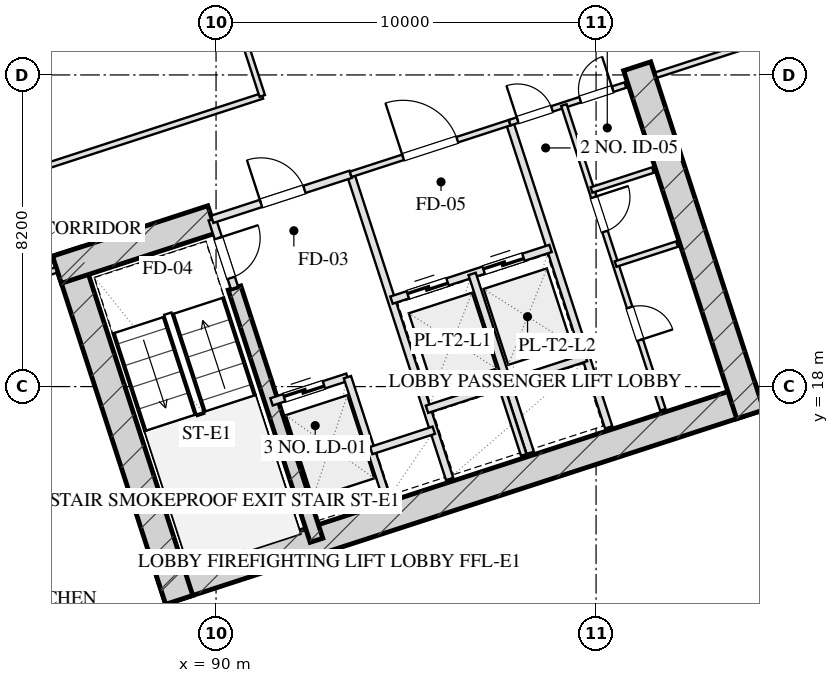
"""IFC4 building model, lengths in metres.
Left out: names, types, materials, properties, quantities, classifications, styles, units other than length and angle.
Written with IfcOpenShell. Run it as: python <this file> out.ifc"""

import sys

from ifc_helpers import new_model, si_unit, direction, frame, frame_2d, origin, place, context, subcontext, project, spatial, rectangle, extrude, element, fill, save


model = new_model("IFC4")
c1 = context("Model", 3, precision=1e-05, world=origin(), true_north=direction((0.0, 1.0)))
c2 = subcontext(c1, "Body", "Model", "MODEL_VIEW")
j1 = project(units=[si_unit("LENGTHUNIT", "METRE"), si_unit("PLANEANGLEUNIT", "RADIAN")], contexts=[c1])
p1 = place(None, origin())
s1 = spatial("IfcSite", under=j1, at=p1, CompositionType="ELEMENT")
p2 = place(p1, origin())
s2 = spatial("IfcBuilding", under=s1, at=p2, CompositionType="ELEMENT")
p3 = place(p2, frame((0.0, 0.0, 71.3)))
s3 = spatial("IfcBuildingStorey", under=s2, at=p3, CompositionType="ELEMENT", Elevation=71.3)
p4 = place(p3, frame((88.559, 12.629, 0.0), z_axis=(0.0, 0.0, 1.0), x_axis=(0.951056072937, 0.309018358888, 0.0)))
e1 = element("IfcWall", 1, at=p4, inside=s3, PredefinedType="SHEAR", context=c2, shape_type="SweptSolid", body=[
    extrude(rectangle(XDim=16.55, YDim=0.75, at=frame_2d((8.275, 0.0))), origin(), (0.0, 0.0, 1.0), 3.45),
])
p5 = place(p3, frame((86.055, 21.546, 0.0), z_axis=(0.0, 0.0, 1.0), x_axis=(0.309023585745, -0.951054374604, 0.0)))
e2 = element("IfcWall", 2, at=p5, inside=s3, PredefinedType="SHEAR", context=c2, shape_type="SweptSolid", body=[
    extrude(rectangle(XDim=9.63, YDim=0.75, at=frame_2d((4.815, 0.0))), origin(), (0.0, 0.0, 1.0), 3.45),
])
p6 = place(p3, frame((101.082, 26.429, 0.0), z_axis=(0.0, 0.0, 1.0), x_axis=(0.309016134813, -0.951056795583, 0.0)))
e3 = element("IfcWall", 3, at=p6, inside=s3, PredefinedType="SHEAR", context=c2, shape_type="SweptSolid", body=[
    extrude(rectangle(XDim=9.63, YDim=0.75, at=frame_2d((4.815, 0.0))), origin(), (0.0, 0.0, 1.0), 3.45),
])
p7 = place(p3, frame((90.486, 20.594, 0.0), z_axis=(0.0, 0.0, 1.0), x_axis=(0.309020428229, -0.951055400562, 0.0)))
e4 = element("IfcWall", 4, at=p7, inside=s3, PredefinedType="SHEAR", context=c2, shape_type="SweptSolid", body=[
    extrude(rectangle(XDim=6.98, YDim=0.35, at=frame_2d((3.49, 0.0))), origin(), (0.0, 0.0, 1.0), 3.45),
])
p8 = place(p3, frame((85.814, 21.074, 0.0), z_axis=(0.0, 0.0, 1.0), x_axis=(0.95106580992, 0.308988390074, 0.0)))
e5 = element("IfcWall", 5, at=p8, inside=s3, PredefinedType="SHEAR", context=c2, shape_type="SweptSolid", body=[
    extrude(rectangle(XDim=4.295, YDim=0.75, at=frame_2d((2.147, 0.0))), origin(), (0.0, 0.0, 1.0), 3.45),
])
p9 = place(p3, frame((100.345, 63.648, 0.0), z_axis=(0.0, 0.0, 1.0), x_axis=(0.309014526607, -0.951057318118, 0.0)))
e6 = element("IfcWall", 6, at=p9, inside=s3, PredefinedType="SOLIDWALL", context=c2, shape_type="SweptSolid", body=[
    extrude(rectangle(XDim=50.0, YDim=0.4, at=frame_2d((25.0, 0.0))), origin(), (0.0, 0.0, 1.0), 2.61),
])
p10 = place(p9, frame((30.15, 0.0, 0.75)))
e7 = element("IfcOpeningElement", 7, at=p10, cuts=e6, PredefinedType="OPENING", context=c2, shape_type="SweptSolid", body=[
    extrude(rectangle(XDim=2.5, YDim=1.46, at=frame_2d((1.25, 0.73))), frame((0.0, 0.21, 0.0), z_axis=(0.0, -1.0, 0.0), x_axis=(1.0, 0.0, 0.0)), (0.0, 0.0, 1.0), 0.42),
])
p11 = place(p9, frame((21.445, 0.0, 0.0)))
e8 = element("IfcOpeningElement", 8, at=p11, cuts=e6, PredefinedType="OPENING", context=c2, shape_type="SweptSolid", body=[
    extrude(rectangle(XDim=1.1, YDim=2.15, at=frame_2d((0.55, 1.075))), frame((0.0, 0.21, 0.0), z_axis=(0.0, -1.0, 0.0), x_axis=(1.0, 0.0, 0.0)), (0.0, 0.0, 1.0), 0.42),
])
p12 = place(p3, frame((113.998, 12.567, 0.0), z_axis=(0.0, 0.0, 1.0), x_axis=(-0.951055939317, -0.309018770125, 0.0)))
e9 = element("IfcWall", 9, at=p12, inside=s3, PredefinedType="SOLIDWALL", context=c2, shape_type="SweptSolid", body=[
    extrude(rectangle(XDim=32.4, YDim=0.4, at=frame_2d((16.2, 0.0))), origin(), (0.0, 0.0, 1.0), 2.61),
])
p13 = place(p3, frame((89.899, 22.401, 0.0), z_axis=(0.0, 0.0, 1.0), x_axis=(0.308932062672, -0.951084108086, 0.0)))
e10 = element("IfcWall", 10, at=p13, inside=s3, PredefinedType="PARTITIONING", context=c2, shape_type="SweptSolid", body=[
    extrude(rectangle(XDim=1.9, YDim=0.2, at=frame_2d((0.95, 0.0))), origin(), (0.0, 0.0, 1.0), 3.175),
])
p14 = place(p13, frame((0.52, 0.0, 0.0)))
e11 = element("IfcOpeningElement", 11, at=p14, cuts=e10, PredefinedType="OPENING", context=c2, shape_type="SweptSolid", body=[
    extrude(rectangle(XDim=1.1, YDim=2.05, at=frame_2d((0.55, 1.025))), frame((0.0, 0.11, 0.0), z_axis=(0.0, -1.0, 0.0), x_axis=(1.0, 0.0, 0.0)), (0.0, 0.0, 1.0), 0.22),
])
p15 = place(p3, frame((93.542, 23.585, 0.0), z_axis=(0.0, 0.0, 1.0), x_axis=(0.309042196757, -0.951048327176, 0.0)))
e12 = element("IfcWall", 12, at=p15, inside=s3, PredefinedType="PARTITIONING", context=c2, shape_type="SweptSolid", body=[
    extrude(rectangle(XDim=8.43, YDim=0.2, at=frame_2d((4.215, 0.0))), origin(), (0.0, 0.0, 1.0), 3.175),
])
p16 = place(p3, frame((89.899, 22.401, 0.0), z_axis=(0.0, 0.0, 1.0), x_axis=(0.951046716504, 0.309047153403, 0.0)))
e13 = element("IfcWall", 13, at=p16, inside=s3, PredefinedType="PARTITIONING", context=c2, shape_type="SweptSolid", body=[
    extrude(rectangle(XDim=3.83, YDim=0.2, at=frame_2d((1.915, 0.0))), origin(), (0.0, 0.0, 1.0), 3.175),
])
p17 = place(p16, frame((1.35, 0.0, 0.0)))
e14 = element("IfcOpeningElement", 14, at=p17, cuts=e13, PredefinedType="OPENING", context=c2, shape_type="SweptSolid", body=[
    extrude(rectangle(XDim=1.2, YDim=2.05, at=frame_2d((0.6, 1.025))), frame((0.0, 0.11, 0.0), z_axis=(0.0, -1.0, 0.0), x_axis=(1.0, 0.0, 0.0)), (0.0, 0.0, 1.0), 0.22),
])
p18 = place(p3, frame((91.46, 17.598, 0.0), z_axis=(0.0, 0.0, 1.0), x_axis=(0.951062257173, 0.308999325213, 0.0)))
e15 = element("IfcWall", 15, at=p18, inside=s3, PredefinedType="PARTITIONING", context=c2, shape_type="SweptSolid", body=[
    extrude(rectangle(XDim=2.1, YDim=0.2, at=frame_2d((1.05, 0.0))), origin(), (0.0, 0.0, 1.0), 3.175),
])
p19 = place(p18, frame((0.35, 0.0, 0.0)))
e16 = element("IfcOpeningElement", 16, at=p19, cuts=e15, PredefinedType="OPENING", context=c2, shape_type="SweptSolid", body=[
    extrude(rectangle(XDim=1.1, YDim=2.05, at=frame_2d((0.55, 1.025))), frame((0.0, 0.11, 0.0), z_axis=(0.0, -1.0, 0.0), x_axis=(1.0, 0.0, 0.0)), (0.0, 0.0, 1.0), 0.22),
])
p20 = place(p3, frame((93.457, 18.247, 0.0), z_axis=(0.0, 0.0, 1.0), x_axis=(0.3089935693, -0.951064127245, 0.0)))
e17 = element("IfcWall", 17, at=p20, inside=s3, PredefinedType="PARTITIONING", context=c2, shape_type="SweptSolid", body=[
    extrude(rectangle(XDim=3.7, YDim=0.2, at=frame_2d((1.85, 0.0))), origin(), (0.0, 0.0, 1.0), 3.175),
])
p21 = place(p3, frame((94.084, 16.317, 0.0), z_axis=(0.0, 0.0, 1.0), x_axis=(0.951041328149, 0.309063734775, 0.0)))
e18 = element("IfcWall", 18, at=p21, inside=s3, PredefinedType="PARTITIONING", context=c2, shape_type="SweptSolid", body=[
    extrude(rectangle(XDim=1.73, YDim=0.2, at=frame_2d((0.865, 0.0))), origin(), (0.0, 0.0, 1.0), 3.175),
])
p22 = place(p3, frame((97.727, 24.944, 0.0), z_axis=(0.0, 0.0, 1.0), x_axis=(0.309016001439, -0.951056838919, 0.0)))
e19 = element("IfcWall", 19, at=p22, inside=s3, PredefinedType="PARTITIONING", context=c2, shape_type="SweptSolid", body=[
    extrude(rectangle(XDim=8.43, YDim=0.2, at=frame_2d((4.215, 0.0))), origin(), (0.0, 0.0, 1.0), 3.175),
])
p23 = place(p3, frame((93.542, 23.585, 0.0), z_axis=(0.0, 0.0, 1.0), x_axis=(0.951063829732, 0.308994485023, 0.0)))
e20 = element("IfcWall", 20, at=p23, inside=s3, PredefinedType="PARTITIONING", context=c2, shape_type="SweptSolid", body=[
    extrude(rectangle(XDim=4.4, YDim=0.15, at=frame_2d((2.2, 0.0))), origin(), (0.0, 0.0, 1.0), 3.175),
])
p24 = place(p23, frame((1.45, 0.0, 0.0)))
e21 = element("IfcOpeningElement", 21, at=p24, cuts=e20, PredefinedType="OPENING", context=c2, shape_type="SweptSolid", body=[
    extrude(rectangle(XDim=1.5, YDim=2.05, at=frame_2d((0.75, 1.025))), frame((0.0, 0.085, 0.0), z_axis=(0.0, -1.0, 0.0), x_axis=(1.0, 0.0, 0.0)), (0.0, 0.0, 1.0), 0.17),
])
p25 = place(p3, frame((94.617, 20.275, 0.0), z_axis=(0.0, 0.0, 1.0), x_axis=(0.951058531764, 0.30901079133, 0.0)))
e22 = element("IfcWall", 22, at=p25, inside=s3, PredefinedType="PARTITIONING", context=c2, shape_type="SweptSolid", body=[
    extrude(rectangle(XDim=4.4, YDim=0.2, at=frame_2d((2.2, 0.0))), origin(), (0.0, 0.0, 1.0), 3.175),
])
p26 = place(p25, frame((0.45, 0.0, 0.0)))
e23 = element("IfcOpeningElement", 23, at=p26, cuts=e22, PredefinedType="OPENING", context=c2, shape_type="SweptSolid", body=[
    extrude(rectangle(XDim=1.1, YDim=2.05, at=frame_2d((0.55, 1.025))), frame((0.0, 0.11, 0.0), z_axis=(0.0, -1.0, 0.0), x_axis=(1.0, 0.0, 0.0)), (0.0, 0.0, 1.0), 0.22),
])
p27 = place(p25, frame((2.55, 0.0, 0.0)))
e24 = element("IfcOpeningElement", 24, at=p27, cuts=e22, PredefinedType="OPENING", context=c2, shape_type="SweptSolid", body=[
    extrude(rectangle(XDim=1.1, YDim=2.05, at=frame_2d((0.55, 1.025))), frame((0.0, 0.11, 0.0), z_axis=(0.0, -1.0, 0.0), x_axis=(1.0, 0.0, 0.0)), (0.0, 0.0, 1.0), 0.22),
])
p28 = place(p3, frame((96.738, 20.964, 0.0), z_axis=(0.0, 0.0, 1.0), x_axis=(0.309042578481, -0.951048203135, 0.0)))
e25 = element("IfcWall", 25, at=p28, inside=s3, PredefinedType="PARTITIONING", context=c2, shape_type="SweptSolid", body=[
    extrude(rectangle(XDim=4.95, YDim=0.2, at=frame_2d((2.475, 0.0))), origin(), (0.0, 0.0, 1.0), 3.175),
])
p29 = place(p3, frame((95.551, 17.403, 0.0), z_axis=(0.0, 0.0, 1.0), x_axis=(0.951058531764, 0.30901079133, 0.0)))
e26 = element("IfcWall", 26, at=p29, inside=s3, PredefinedType="PARTITIONING", context=c2, shape_type="SweptSolid", body=[
    extrude(rectangle(XDim=4.4, YDim=0.2, at=frame_2d((2.2, 0.0))), origin(), (0.0, 0.0, 1.0), 3.175),
])
p30 = place(p3, frame((97.516, 17.989, 0.0), z_axis=(0.0, 0.0, 1.0), x_axis=(0.30897153969, -0.951071284217, 0.0)))
e27 = element("IfcWall", 27, at=p30, inside=s3, PredefinedType="PARTITIONING", context=c2, shape_type="SweptSolid", body=[
    extrude(rectangle(XDim=1.88, YDim=0.15, at=frame_2d((0.94, 0.0))), origin(), (0.0, 0.0, 1.0), 3.175),
])
p31 = place(p3, frame((97.727, 24.944, 0.0), z_axis=(0.0, 0.0, 1.0), x_axis=(0.951036872128, 0.309077446369, 0.0)))
e28 = element("IfcWall", 28, at=p31, inside=s3, PredefinedType="PARTITIONING", context=c2, shape_type="SweptSolid", body=[
    extrude(rectangle(XDim=3.2, YDim=0.15, at=frame_2d((1.6, 0.0))), origin(), (0.0, 0.0, 1.0), 3.175),
])
p32 = place(p31, frame((0.22, 0.0, 0.0)))
e29 = element("IfcOpeningElement", 29, at=p32, cuts=e28, PredefinedType="OPENING", context=c2, shape_type="SweptSolid", body=[
    extrude(rectangle(XDim=0.95, YDim=2.05, at=frame_2d((0.475, 1.025))), frame((0.0, 0.085, 0.0), z_axis=(0.0, -1.0, 0.0), x_axis=(1.0, 0.0, 0.0)), (0.0, 0.0, 1.0), 0.17),
])
p33 = place(p31, frame((1.95, 0.0, 0.0)))
e30 = element("IfcOpeningElement", 30, at=p33, cuts=e28, PredefinedType="OPENING", context=c2, shape_type="SweptSolid", body=[
    extrude(rectangle(XDim=0.9, YDim=2.05, at=frame_2d((0.45, 1.025))), frame((0.0, 0.085, 0.0), z_axis=(0.0, -1.0, 0.0), x_axis=(1.0, 0.0, 0.0)), (0.0, 0.0, 1.0), 0.17),
])
p34 = place(p3, frame((99.153, 25.408, 0.0), z_axis=(0.0, 0.0, 1.0), x_axis=(0.309016001439, -0.951056838919, 0.0)))
e31 = element("IfcWall", 31, at=p34, inside=s3, PredefinedType="PARTITIONING", context=c2, shape_type="SweptSolid", body=[
    extrude(rectangle(XDim=8.43, YDim=0.15, at=frame_2d((4.215, 0.0))), origin(), (0.0, 0.0, 1.0), 3.175),
])
p35 = place(p34, frame((2.55, 0.0, 0.0)))
e32 = element("IfcOpeningElement", 32, at=p35, cuts=e31, PredefinedType="OPENING", context=c2, shape_type="SweptSolid", body=[
    extrude(rectangle(XDim=0.95, YDim=2.05, at=frame_2d((0.475, 1.025))), frame((0.0, 0.085, 0.0), z_axis=(0.0, -1.0, 0.0), x_axis=(1.0, 0.0, 0.0)), (0.0, 0.0, 1.0), 0.17),
])
p36 = place(p34, frame((5.6, 0.0, 0.0)))
e33 = element("IfcOpeningElement", 33, at=p36, cuts=e31, PredefinedType="OPENING", context=c2, shape_type="SweptSolid", body=[
    extrude(rectangle(XDim=0.9, YDim=2.05, at=frame_2d((0.45, 1.025))), frame((0.0, 0.085, 0.0), z_axis=(0.0, -1.0, 0.0), x_axis=(1.0, 0.0, 0.0)), (0.0, 0.0, 1.0), 0.17),
])
for number, where, z_axis, x_axis in (
    (34, (100.513, 21.223, 0.0), (0.0, 0.0, 1.0), (0.951, 0.309, 0.0)),
    (35, (99.879, 23.173, 0.0), (0.0, 0.0, 1.0), (0.951, 0.309, 0.0)),
):
    element("IfcWall", number, at=place(p3, frame(where, z_axis=z_axis, x_axis=x_axis)), inside=s3, PredefinedType="PARTITIONING", context=c2, shape_type="SweptSolid", body=[
        extrude(rectangle(XDim=1.7, YDim=0.15, at=frame_2d((0.85, 0.0))), origin(), (0.0, 0.0, 1.0), 3.175),
    ])
p37 = place(p3, frame((75.519, 17.729, 0.0), z_axis=(0.0, 0.0, 1.0), x_axis=(0.951056658866, 0.309016555588, 0.0)))
e36 = element("IfcWall", 36, at=p37, inside=s3, PredefinedType="PARTITIONING", context=c2, shape_type="SweptSolid", body=[
    extrude(rectangle(XDim=10.8, YDim=0.15, at=frame_2d((5.4, 0.0))), origin(), (0.0, 0.0, 1.0), 3.175),
])
p38 = place(p37, frame((4.536, 0.0, 0.0)))
e37 = element("IfcOpeningElement", 37, at=p38, cuts=e36, PredefinedType="OPENING", context=c2, shape_type="SweptSolid", body=[
    extrude(rectangle(XDim=1.0, YDim=2.05, at=frame_2d((0.5, 1.025))), frame((0.0, 0.085, 0.0), z_axis=(0.0, -1.0, 0.0), x_axis=(1.0, 0.0, 0.0)), (0.0, 0.0, 1.0), 0.17),
])
p39 = place(p3, frame((101.578, 26.196, 0.0), z_axis=(0.0, 0.0, 1.0), x_axis=(0.951059043131, 0.309009217467, 0.0)))
e38 = element("IfcWall", 38, at=p39, inside=s3, PredefinedType="PARTITIONING", context=c2, shape_type="SweptSolid", body=[
    extrude(rectangle(XDim=10.2, YDim=0.15, at=frame_2d((5.1, 0.0))), origin(), (0.0, 0.0, 1.0), 3.175),
])
p40 = place(p39, frame((4.284, 0.0, 0.0)))
e39 = element("IfcOpeningElement", 39, at=p40, cuts=e38, PredefinedType="OPENING", context=c2, shape_type="SweptSolid", body=[
    extrude(rectangle(XDim=1.0, YDim=2.05, at=frame_2d((0.5, 1.025))), frame((0.0, 0.085, 0.0), z_axis=(0.0, -1.0, 0.0), x_axis=(1.0, 0.0, 0.0)), (0.0, 0.0, 1.0), 0.17),
])
p41 = place(p3, frame((74.691, 20.278, 0.0), z_axis=(0.0, 0.0, 1.0), x_axis=(0.951053169828, 0.309027293551, 0.0)))
e40 = element("IfcWall", 40, at=p41, inside=s3, PredefinedType="PARTITIONING", context=c2, shape_type="SweptSolid", body=[
    extrude(rectangle(XDim=17.375, YDim=0.15, at=frame_2d((8.688, 0.0))), origin(), (0.0, 0.0, 1.0), 3.175),
])
p42 = place(p3, frame((91.216, 25.647, 0.0), z_axis=(0.0, 0.0, 1.0), x_axis=(-0.309022042254, 0.951054876125, 0.0)))
e41 = element("IfcWall", 41, at=p42, inside=s3, PredefinedType="PARTITIONING", context=c2, shape_type="SweptSolid", body=[
    extrude(rectangle(XDim=16.64, YDim=0.15, at=frame_2d((8.32, 0.0))), origin(), (0.0, 0.0, 1.0), 3.175),
])
p43 = place(p42, frame((1.66, 0.0, 0.0)))
e42 = element("IfcOpeningElement", 42, at=p43, cuts=e41, PredefinedType="OPENING", context=c2, shape_type="SweptSolid", body=[
    extrude(rectangle(XDim=1.05, YDim=2.05, at=frame_2d((0.525, 1.025))), frame((0.0, 0.085, 0.0), z_axis=(0.0, -1.0, 0.0), x_axis=(1.0, 0.0, 0.0)), (0.0, 0.0, 1.0), 0.17),
])
p44 = place(p42, frame((7.82, 0.0, 0.0)))
e43 = element("IfcOpeningElement", 43, at=p44, cuts=e41, PredefinedType="OPENING", context=c2, shape_type="SweptSolid", body=[
    extrude(rectangle(XDim=1.0, YDim=2.05, at=frame_2d((0.5, 1.025))), frame((0.0, 0.085, 0.0), z_axis=(0.0, -1.0, 0.0), x_axis=(1.0, 0.0, 0.0)), (0.0, 0.0, 1.0), 0.17),
])
p45 = place(p42, frame((13.98, 0.0, 0.0)))
e44 = element("IfcOpeningElement", 44, at=p45, cuts=e41, PredefinedType="OPENING", context=c2, shape_type="SweptSolid", body=[
    extrude(rectangle(XDim=1.0, YDim=2.05, at=frame_2d((0.5, 1.025))), frame((0.0, 0.085, 0.0), z_axis=(0.0, -1.0, 0.0), x_axis=(1.0, 0.0, 0.0)), (0.0, 0.0, 1.0), 0.17),
])
p46 = place(p3, frame((73.356, 24.386, 0.0), z_axis=(0.0, 0.0, 1.0), x_axis=(0.951057299418, 0.309014584159, 0.0)))
e45 = element("IfcWall", 45, at=p46, inside=s3, PredefinedType="PARTITIONING", context=c2, shape_type="SweptSolid", body=[
    extrude(rectangle(XDim=17.375, YDim=0.15, at=frame_2d((8.688, 0.0))), origin(), (0.0, 0.0, 1.0), 3.175),
])
p47 = place(p14, origin())
e46 = element("IfcDoor", 46, at=p47, inside=s3, OperationType="SINGLE_SWING_LEFT", PredefinedType="DOOR", context=c2, shape_type="SweptSolid", body=[
    extrude(rectangle(XDim=1.1, YDim=2.05, at=frame_2d((0.55, 1.025))), frame((0.0, 0.025, 0.0), z_axis=(0.0, -1.0, 0.0), x_axis=(1.0, 0.0, 0.0)), (0.0, 0.0, 1.0), 0.05),
])
fill(e11, e46)
p48 = place(p17, origin())
e47 = element("IfcDoor", 47, at=p48, inside=s3, OperationType="SINGLE_SWING_LEFT", PredefinedType="DOOR", context=c2, shape_type="SweptSolid", body=[
    extrude(rectangle(XDim=1.2, YDim=2.05, at=frame_2d((0.6, 1.025))), frame((0.0, 0.025, 0.0), z_axis=(0.0, -1.0, 0.0), x_axis=(1.0, 0.0, 0.0)), (0.0, 0.0, 1.0), 0.05),
])
fill(e14, e47)
p49 = place(p19, origin())
e48 = element("IfcDoor", 48, at=p49, inside=s3, OperationType="DOUBLE_DOOR_SLIDING", PredefinedType="DOOR", context=c2, shape_type="SweptSolid", body=[
    extrude(rectangle(XDim=1.1, YDim=2.05, at=frame_2d((0.55, 1.025))), frame((0.0, 0.025, 0.0), z_axis=(0.0, -1.0, 0.0), x_axis=(1.0, 0.0, 0.0)), (0.0, 0.0, 1.0), 0.05),
])
fill(e16, e48)
p50 = place(p24, origin())
e49 = element("IfcDoor", 49, at=p50, inside=s3, OperationType="SINGLE_SWING_LEFT", PredefinedType="DOOR", context=c2, shape_type="SweptSolid", body=[
    extrude(rectangle(XDim=1.5, YDim=2.05, at=frame_2d((0.75, 1.025))), frame((0.0, 0.025, 0.0), z_axis=(0.0, -1.0, 0.0), x_axis=(1.0, 0.0, 0.0)), (0.0, 0.0, 1.0), 0.05),
])
fill(e21, e49)
p51 = place(p26, origin())
e50 = element("IfcDoor", 50, at=p51, inside=s3, OperationType="DOUBLE_DOOR_SLIDING", PredefinedType="DOOR", context=c2, shape_type="SweptSolid", body=[
    extrude(rectangle(XDim=1.1, YDim=2.05, at=frame_2d((0.55, 1.025))), frame((0.0, 0.025, 0.0), z_axis=(0.0, -1.0, 0.0), x_axis=(1.0, 0.0, 0.0)), (0.0, 0.0, 1.0), 0.05),
])
fill(e23, e50)
p52 = place(p27, origin())
e51 = element("IfcDoor", 51, at=p52, inside=s3, OperationType="DOUBLE_DOOR_SLIDING", PredefinedType="DOOR", context=c2, shape_type="SweptSolid", body=[
    extrude(rectangle(XDim=1.1, YDim=2.05, at=frame_2d((0.55, 1.025))), frame((0.0, 0.025, 0.0), z_axis=(0.0, -1.0, 0.0), x_axis=(1.0, 0.0, 0.0)), (0.0, 0.0, 1.0), 0.05),
])
fill(e24, e51)
p53 = place(p32, origin())
e52 = element("IfcDoor", 52, at=p53, inside=s3, OperationType="SINGLE_SWING_LEFT", PredefinedType="DOOR", context=c2, shape_type="SweptSolid", body=[
    extrude(rectangle(XDim=0.95, YDim=2.05, at=frame_2d((0.475, 1.025))), frame((0.0, 0.025, 0.0), z_axis=(0.0, -1.0, 0.0), x_axis=(1.0, 0.0, 0.0)), (0.0, 0.0, 1.0), 0.05),
])
fill(e29, e52)
p54 = place(p33, origin())
e53 = element("IfcDoor", 53, at=p54, inside=s3, OperationType="SINGLE_SWING_RIGHT", PredefinedType="DOOR", context=c2, shape_type="SweptSolid", body=[
    extrude(rectangle(XDim=0.9, YDim=2.05, at=frame_2d((0.45, 1.025))), frame((0.0, 0.025, 0.0), z_axis=(0.0, -1.0, 0.0), x_axis=(1.0, 0.0, 0.0)), (0.0, 0.0, 1.0), 0.05),
])
fill(e30, e53)
p55 = place(p35, origin())
e54 = element("IfcDoor", 54, at=p55, inside=s3, OperationType="SINGLE_SWING_LEFT", PredefinedType="DOOR", context=c2, shape_type="SweptSolid", body=[
    extrude(rectangle(XDim=0.95, YDim=2.05, at=frame_2d((0.475, 1.025))), frame((0.0, 0.025, 0.0), z_axis=(0.0, -1.0, 0.0), x_axis=(1.0, 0.0, 0.0)), (0.0, 0.0, 1.0), 0.05),
])
fill(e32, e54)
p56 = place(p36, origin())
e55 = element("IfcDoor", 55, at=p56, inside=s3, OperationType="SINGLE_SWING_RIGHT", PredefinedType="DOOR", context=c2, shape_type="SweptSolid", body=[
    extrude(rectangle(XDim=0.9, YDim=2.05, at=frame_2d((0.45, 1.025))), frame((0.0, 0.025, 0.0), z_axis=(0.0, -1.0, 0.0), x_axis=(1.0, 0.0, 0.0)), (0.0, 0.0, 1.0), 0.05),
])
fill(e33, e55)
save(model, sys.argv[1])
